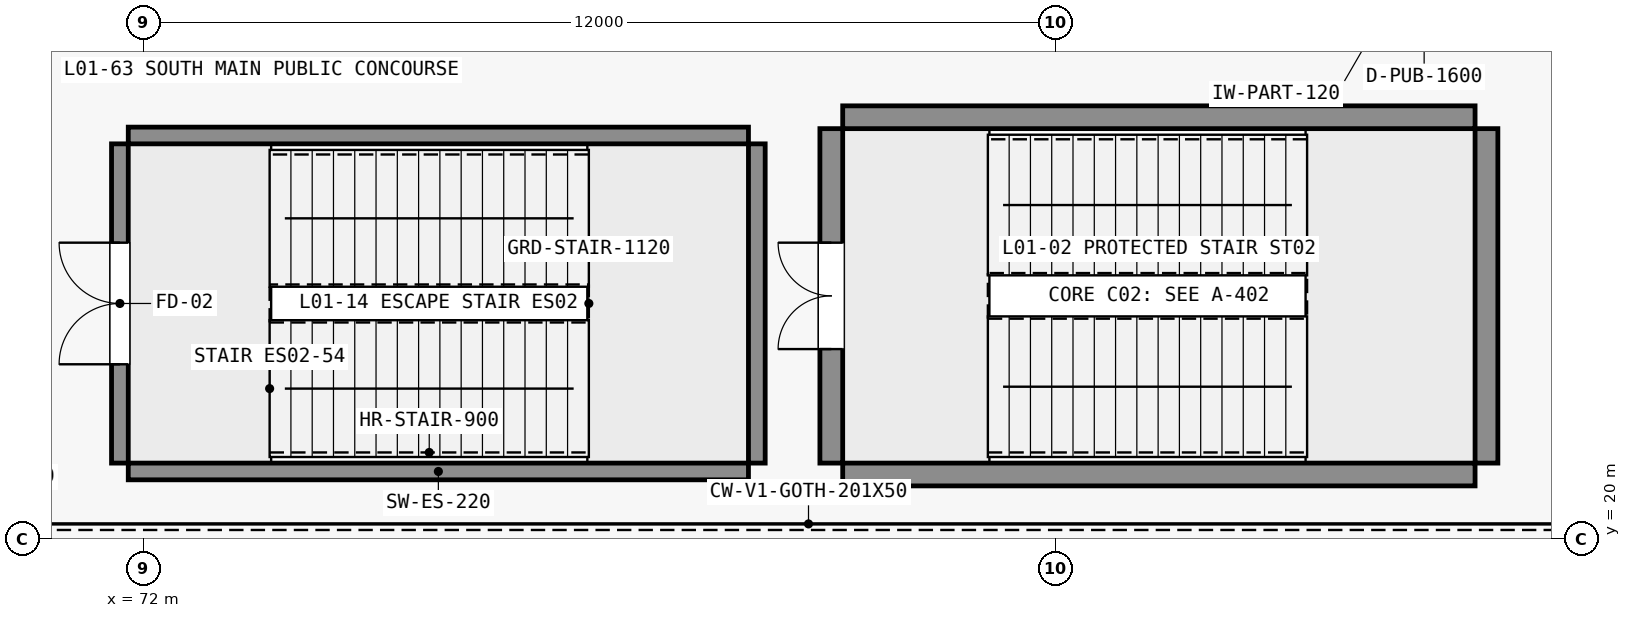
"""IFC4 building model, lengths in metres.
Left out: names, types, materials, properties, quantities, classifications, styles, units other than length and angle.
Written with IfcOpenShell. Run it as: python <this file> out.ifc"""

import sys

from ifc_helpers import new_model, si_unit, direction, frame, frame_2d, origin, place, context, subcontext, project, spatial, rectangle, extrude, element, fill, save


model = new_model("IFC4")
c1 = context("Model", 3, precision=1e-05, world=origin(), true_north=direction((0.0, 1.0)))
c2 = subcontext(c1, "Body", "Model", "MODEL_VIEW")
j1 = project(units=[si_unit("LENGTHUNIT", "METRE"), si_unit("PLANEANGLEUNIT", "RADIAN")], contexts=[c1])
p1 = place(None, origin())
s1 = spatial("IfcSite", under=j1, at=p1, CompositionType="ELEMENT")
p2 = place(p1, origin())
s2 = spatial("IfcBuilding", under=s1, at=p2, CompositionType="ELEMENT")
p3 = place(p2, frame((0.0, 0.0, 6.0)))
s3 = spatial("IfcBuildingStorey", under=s2, at=p3, CompositionType="ELEMENT", Elevation=6.0)
for number, where, z_axis, x_axis in (
    (1, (81.2, 20.85, 0.0), (0.0, 0.0, 1.0), (1.0, 0.0, 0.0)),
    (2, (81.2, 25.55, 0.0), (0.0, 0.0, 1.0), (1.0, 0.0, 0.0)),
):
    element("IfcWall", number, at=place(p3, frame(where, z_axis=z_axis, x_axis=x_axis)), inside=s3, PredefinedType="SHEAR", context=c2, shape_type="SweptSolid", body=[
        extrude(rectangle(XDim=8.32, YDim=0.3, at=frame_2d((4.16, 0.0))), origin(), (0.0, 0.0, 1.0), 5.4),
    ])
p4 = place(p3, frame((81.05, 21.0, 0.0), z_axis=(0.0, 0.0, 1.0), x_axis=(0.0, 1.0, 0.0)))
e3 = element("IfcWall", 3, at=p4, inside=s3, PredefinedType="SHEAR", context=c2, shape_type="SweptSolid", body=[
    extrude(rectangle(XDim=4.4, YDim=0.3, at=frame_2d((2.2, 0.0))), origin(), (0.0, 0.0, 1.0), 5.4),
])
p5 = place(p4, frame((1.5, 0.0, 0.0)))
e4 = element("IfcOpeningElement", 4, at=p5, cuts=e3, PredefinedType="OPENING", context=c2, shape_type="SweptSolid", body=[
    extrude(rectangle(XDim=1.4, YDim=2.2, at=frame_2d((0.7, 1.1))), frame((0.0, 0.16, 0.0), z_axis=(0.0, -1.0, 0.0), x_axis=(1.0, 0.0, 0.0)), (0.0, 0.0, 1.0), 0.32),
])
p6 = place(p3, frame((89.67, 21.0, 0.0), z_axis=(0.0, 0.0, 1.0), x_axis=(0.0, 1.0, 0.0)))
e5 = element("IfcWall", 5, at=p6, inside=s3, PredefinedType="SHEAR", context=c2, shape_type="SweptSolid", body=[
    extrude(rectangle(XDim=4.4, YDim=0.3, at=frame_2d((2.2, 0.0))), origin(), (0.0, 0.0, 1.0), 5.4),
])
for number, where, z_axis, x_axis in (
    (6, (71.8, 20.89, 0.0), (0.0, 0.0, 1.0), (1.0, 0.0, 0.0)),
    (7, (71.8, 25.31, 0.0), (0.0, 0.0, 1.0), (1.0, 0.0, 0.0)),
):
    element("IfcWall", number, at=place(p3, frame(where, z_axis=z_axis, x_axis=x_axis)), inside=s3, PredefinedType="SHEAR", context=c2, shape_type="SweptSolid", body=[
        extrude(rectangle(XDim=8.16, YDim=0.22, at=frame_2d((4.08, 0.0))), origin(), (0.0, 0.0, 1.0), 5.4),
    ])
p7 = place(p3, frame((71.69, 21.0, 0.0), z_axis=(0.0, 0.0, 1.0), x_axis=(0.0, 1.0, 0.0)))
e8 = element("IfcWall", 8, at=p7, inside=s3, PredefinedType="SHEAR", context=c2, shape_type="SweptSolid", body=[
    extrude(rectangle(XDim=4.2, YDim=0.22, at=frame_2d((2.1, 0.0))), origin(), (0.0, 0.0, 1.0), 5.4),
])
p8 = place(p7, frame((1.3, 0.0, 0.0)))
e9 = element("IfcOpeningElement", 9, at=p8, cuts=e8, PredefinedType="OPENING", context=c2, shape_type="SweptSolid", body=[
    extrude(rectangle(XDim=1.6, YDim=2.2, at=frame_2d((0.8, 1.1))), frame((0.0, 0.12, 0.0), z_axis=(0.0, -1.0, 0.0), x_axis=(1.0, 0.0, 0.0)), (0.0, 0.0, 1.0), 0.24),
])
p9 = place(p3, frame((80.07, 21.0, 0.0), z_axis=(0.0, 0.0, 1.0), x_axis=(0.0, 1.0, 0.0)))
e10 = element("IfcWall", 10, at=p9, inside=s3, PredefinedType="SHEAR", context=c2, shape_type="SweptSolid", body=[
    extrude(rectangle(XDim=4.2, YDim=0.22, at=frame_2d((2.1, 0.0))), origin(), (0.0, 0.0, 1.0), 5.4),
])
p10 = place(p5, origin())
e11 = element("IfcDoor", 11, at=p10, inside=s3, OperationType="DOUBLE_DOOR_SINGLE_SWING", PredefinedType="DOOR", context=c2, shape_type="SweptSolid", body=[
    extrude(rectangle(XDim=1.4, YDim=2.2, at=frame_2d((0.7, 1.1))), frame((0.0, 0.025, 0.0), z_axis=(0.0, -1.0, 0.0), x_axis=(1.0, 0.0, 0.0)), (0.0, 0.0, 1.0), 0.05),
])
fill(e4, e11)
p11 = place(p8, origin())
e12 = element("IfcDoor", 12, at=p11, inside=s3, OperationType="DOUBLE_DOOR_SINGLE_SWING", PredefinedType="DOOR", context=c2, shape_type="SweptSolid", body=[
    extrude(rectangle(XDim=1.6, YDim=2.2, at=frame_2d((0.8, 1.1))), frame((0.0, 0.025, 0.0), z_axis=(0.0, -1.0, 0.0), x_axis=(1.0, 0.0, 0.0)), (0.0, 0.0, 1.0), 0.05),
])
fill(e9, e12)
save(model, sys.argv[1])
